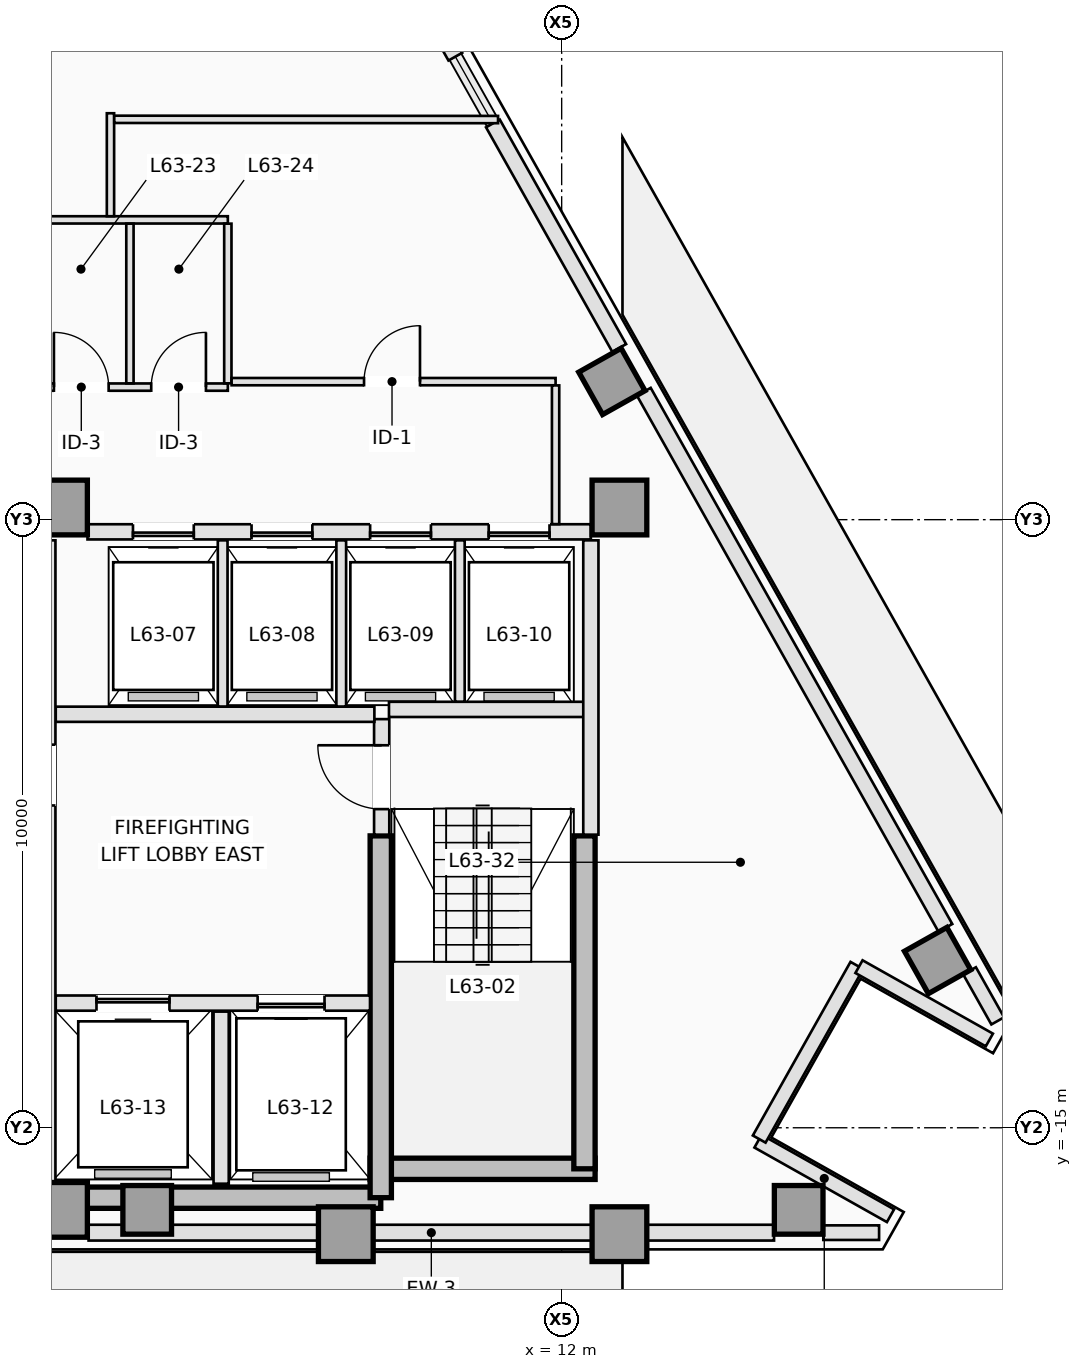
"""IFC4 building model, lengths in metres.
Left out: names, types, materials, properties, quantities, classifications, styles, units other than length and angle.
Written with IfcOpenShell. Run it as: python <this file> out.ifc"""

import sys

from ifc_helpers import new_model, si_unit, direction, frame, frame_2d, origin, origin_2d, place, context, subcontext, project, spatial, rectangle, extrude, element, fill, save


model = new_model("IFC4")
c1 = context("Model", 3, precision=1e-05, world=origin(), true_north=direction((0.0, 1.0)))
c2 = subcontext(c1, "Body", "Model", "MODEL_VIEW")
j1 = project(units=[si_unit("LENGTHUNIT", "METRE"), si_unit("PLANEANGLEUNIT", "RADIAN")], contexts=[c1])
p1 = place(None, origin())
s1 = spatial("IfcSite", under=j1, at=p1, CompositionType="ELEMENT")
p2 = place(p1, origin())
s2 = spatial("IfcBuilding", under=s1, at=p2, CompositionType="ELEMENT")
p3 = place(p2, frame((0.0, 0.0, 228.9)))
s3 = spatial("IfcBuildingStorey", under=s2, at=p3, CompositionType="ELEMENT", Elevation=228.9)
p4 = place(p3, frame((3.75, -16.15, 0.0), z_axis=(0.0, 0.0, 1.0), x_axis=(1.0, 0.0, 0.0)))
e1 = element("IfcWall", 1, at=p4, inside=s3, PredefinedType="SHEAR", context=c2, shape_type="SweptSolid", body=[
    extrude(rectangle(XDim=5.275, YDim=0.35, at=frame_2d((2.637, 0.0))), origin(), (0.0, 0.0, 1.0), 3.5),
])
p5 = place(p3, frame((8.85, -15.675, 0.0), z_axis=(0.0, 0.0, 1.0), x_axis=(1.0, 0.0, 0.0)))
e2 = element("IfcWall", 2, at=p5, inside=s3, PredefinedType="SHEAR", context=c2, shape_type="SweptSolid", body=[
    extrude(rectangle(XDim=3.7, YDim=0.35, at=frame_2d((1.85, 0.0))), origin(), (0.0, 0.0, 1.0), 3.5),
])
p6 = place(p3, frame((12.375, -15.675, 0.0), z_axis=(0.0, 0.0, 1.0), x_axis=(0.0, 1.0, 0.0)))
e3 = element("IfcWall", 3, at=p6, inside=s3, PredefinedType="SHEAR", context=c2, shape_type="SweptSolid", body=[
    extrude(rectangle(XDim=5.475, YDim=0.35, at=frame_2d((2.738, 0.0))), origin(), (0.0, 0.0, 1.0), 3.5),
])
p7 = place(p3, frame((9.025, -16.15, 0.0), z_axis=(0.0, 0.0, 1.0), x_axis=(0.0, 1.0, 0.0)))
e4 = element("IfcWall", 4, at=p7, inside=s3, PredefinedType="SHEAR", context=c2, shape_type="SweptSolid", body=[
    extrude(rectangle(XDim=5.95, YDim=0.35, at=frame_2d((2.975, 0.0))), origin(), (0.0, 0.0, 1.0), 3.5),
])
for number, where, z_axis, x_axis in (
    (5, (3.75, -16.35, 0.0), (0.0, 0.0, 1.0), (1.0, 0.0, 0.0)),
    (6, (8.45, -16.75, 0.0), (0.0, 0.0, 1.0), (1.0, 0.0, 0.0)),
    (7, (12.95, -16.75, 0.0), (0.0, 0.0, 1.0), (1.0, 0.0, 0.0)),
    (8, (3.75, -4.8, 0.0), (0.0, 0.0, 1.0), (1.0, 0.0, 0.0)),
    (9, (12.95, -4.8, 0.0), (0.0, 0.0, 1.0), (1.0, 0.0, 0.0)),
):
    element("IfcColumn", number, at=place(p3, frame(where, z_axis=z_axis, x_axis=x_axis)), inside=s3, PredefinedType="COLUMN", context=c2, shape_type="SweptSolid", body=[
        extrude(rectangle(XDim=0.9, YDim=0.9, at=origin_2d()), origin(), (0.0, 0.0, 1.0), 3.5),
    ])
for number, where, z_axis, x_axis in (
    (10, (5.184, -16.35, 0.0), (0.0, 0.0, 1.0), (0.0, 1.0, 0.0)),
    (11, (15.898, -16.35, 0.0), (0.0, 0.0, 1.0), (0.0, 1.0, 0.0)),
    (12, (18.182, -12.25, 0.0), (0.0, 0.0, 1.0), (0.872, 0.49, 0.0)),
    (13, (12.825, -2.727, 0.0), (0.0, 0.0, 1.0), (0.872, 0.49, 0.0)),
):
    element("IfcColumn", number, at=place(p3, frame(where, z_axis=z_axis, x_axis=x_axis)), inside=s3, PredefinedType="COLUMN", context=c2, shape_type="SweptSolid", body=[
        extrude(rectangle(XDim=0.8, YDim=0.8, at=origin_2d()), origin(), (0.0, 0.0, 1.0), 3.5),
    ])
p8 = place(p3, frame((17.22, -16.725, 0.0), z_axis=(0.0, 0.0, 1.0), x_axis=(-1.0, 0.0, 0.0)))
e14 = element("IfcWall", 14, at=p8, inside=s3, PredefinedType="STANDARD", context=c2, shape_type="SweptSolid", body=[
    extrude(rectangle(XDim=0.917, YDim=0.24, at=frame_2d((0.459, 0.0))), origin(), (0.0, 0.0, 1.0), 3.25),
])
p9 = place(p3, frame((15.493, -16.725, 0.0), z_axis=(0.0, 0.0, 1.0), x_axis=(-1.0, 0.0, 0.0)))
e15 = element("IfcWall", 15, at=p9, inside=s3, PredefinedType="STANDARD", context=c2, shape_type="SweptSolid", body=[
    extrude(rectangle(XDim=11.273, YDim=0.26, at=frame_2d((5.636, 0.0))), origin(), (0.0, 0.0, 1.0), 2.79),
])
p10 = place(p3, frame((18.708, -12.419, 0.0), z_axis=(0.0, 0.0, 1.0), x_axis=(0.490199895283, -0.871610040479, 0.0)))
e16 = element("IfcWall", 16, at=p10, inside=s3, PredefinedType="STANDARD", context=c2, shape_type="SweptSolid", body=[
    extrude(rectangle(XDim=0.945, YDim=0.24, at=frame_2d((0.472, 0.0))), origin(), (0.0, 0.0, 1.0), 3.25),
])
p11 = place(p3, frame((13.351, -2.896, 0.0), z_axis=(0.0, 0.0, 1.0), x_axis=(0.490266968583, -0.871572314565, 0.0)))
e17 = element("IfcWall", 17, at=p11, inside=s3, PredefinedType="STANDARD", context=c2, shape_type="SweptSolid", body=[
    extrude(rectangle(XDim=10.116, YDim=0.26, at=frame_2d((5.058, 0.0))), origin(), (0.0, 0.0, 1.0), 3.25),
])
p12 = place(p3, frame((8.174, 6.307, 0.0), z_axis=(0.0, 0.0, 1.0), x_axis=(0.490269447258, -0.871570920284, 0.0)))
e18 = element("IfcWall", 18, at=p12, inside=s3, PredefinedType="STANDARD", context=c2, shape_type="SweptSolid", body=[
    extrude(rectangle(XDim=4.237, YDim=0.26, at=frame_2d((2.118, 0.0))), origin(), (0.0, 0.0, 1.0), 3.25),
])
p13 = place(p3, frame((10.869, 1.516, 0.0), z_axis=(0.0, 0.0, 1.0), x_axis=(0.490244825075, -0.871584770109, 0.0)))
e19 = element("IfcWall", 19, at=p13, inside=s3, PredefinedType="STANDARD", context=c2, shape_type="SweptSolid", body=[
    extrude(rectangle(XDim=4.237, YDim=0.26, at=frame_2d((2.119, 0.0))), origin(), (0.0, 0.0, 1.0), 3.25),
])
p14 = place(p3, frame((17.408, -16.447, 0.0), z_axis=(0.0, 0.0, 1.0), x_axis=(-0.871588577066, 0.490238056792, 0.0)))
e20 = element("IfcWall", 20, at=p14, inside=s3, PredefinedType="STANDARD", context=c2, shape_type="SweptSolid", body=[
    extrude(rectangle(XDim=2.5, YDim=0.24, at=frame_2d((1.25, 0.0))), origin(), (0.0, 0.0, 1.0), 3.25),
])
p15 = place(p3, frame((15.248, -15.186, 0.0), z_axis=(0.0, 0.0, 1.0), x_axis=(0.490293083368, 0.871557624258, 0.0)))
e21 = element("IfcWall", 21, at=p15, inside=s3, PredefinedType="STANDARD", context=c2, shape_type="SweptSolid", body=[
    extrude(rectangle(XDim=3.276, YDim=0.24, at=frame_2d((1.638, 0.0))), origin(), (0.0, 0.0, 1.0), 2.79),
])
p16 = place(p3, frame((16.889, -12.35, 0.0), z_axis=(0.0, 0.0, 1.0), x_axis=(0.87157023615, -0.490270663468, 0.0)))
e22 = element("IfcWall", 22, at=p16, inside=s3, PredefinedType="STANDARD", context=c2, shape_type="SweptSolid", body=[
    extrude(rectangle(XDim=2.46, YDim=0.24, at=frame_2d((1.23, 0.0))), origin(), (0.0, 0.0, 1.0), 3.25),
])
p17 = place(p3, frame((9.04, -10.18, 0.0), z_axis=(0.0, 0.0, 1.0), x_axis=(0.0, 1.0, 0.0)))
e23 = element("IfcWall", 23, at=p17, inside=s3, PredefinedType="PARTITIONING", context=c2, shape_type="SweptSolid", body=[
    extrude(rectangle(XDim=1.9, YDim=0.25, at=frame_2d((0.95, 0.0))), origin(), (0.0, 0.0, 1.0), 3.25),
])
p18 = place(p17, frame((0.42, 0.0, 0.0)))
e24 = element("IfcOpeningElement", 24, at=p18, cuts=e23, PredefinedType="OPENING", context=c2, shape_type="SweptSolid", body=[
    extrude(rectangle(XDim=1.05, YDim=2.15, at=frame_2d((0.525, 1.075))), frame((0.0, 0.135, 0.0), z_axis=(0.0, -1.0, 0.0), x_axis=(1.0, 0.0, 0.0)), (0.0, 0.0, 1.0), 0.27),
])
p19 = place(p3, frame((9.16, -8.12, 0.0), z_axis=(0.0, 0.0, 1.0), x_axis=(1.0, 0.0, 0.0)))
e25 = element("IfcWall", 25, at=p19, inside=s3, PredefinedType="PARTITIONING", context=c2, shape_type="SweptSolid", body=[
    extrude(rectangle(XDim=3.22, YDim=0.25, at=frame_2d((1.61, 0.0))), origin(), (0.0, 0.0, 1.0), 3.25),
])
p20 = place(p3, frame((12.48, -10.18, 0.0), z_axis=(0.0, 0.0, 1.0), x_axis=(0.0, 1.0, 0.0)))
e26 = element("IfcWall", 26, at=p20, inside=s3, PredefinedType="PARTITIONING", context=c2, shape_type="SweptSolid", body=[
    extrude(rectangle(XDim=4.84, YDim=0.25, at=frame_2d((2.42, 0.0))), origin(), (0.0, 0.0, 1.0), 3.25),
])
p21 = place(p3, frame((3.68, -12.95, 0.0), z_axis=(0.0, 0.0, 1.0), x_axis=(1.0, 0.0, 0.0)))
e27 = element("IfcWall", 27, at=p21, inside=s3, PredefinedType="PARTITIONING", context=c2, shape_type="SweptSolid", body=[
    extrude(rectangle(XDim=5.168, YDim=0.25, at=frame_2d((2.584, 0.0))), origin(), (0.0, 0.0, 1.0), 3.25),
])
p22 = place(p21, frame((3.32, 0.0, 0.0)))
e28 = element("IfcOpeningElement", 28, at=p22, cuts=e27, PredefinedType="OPENING", context=c2, shape_type="SweptSolid", body=[
    extrude(rectangle(XDim=1.1, YDim=2.15, at=frame_2d((0.55, 1.075))), frame((0.0, 0.135, 0.0), z_axis=(0.0, -1.0, 0.0), x_axis=(1.0, 0.0, 0.0)), (0.0, 0.0, 1.0), 0.27),
])
p23 = place(p21, frame((0.67, 0.0, 0.0)))
e29 = element("IfcOpeningElement", 29, at=p23, cuts=e27, PredefinedType="OPENING", context=c2, shape_type="SweptSolid", body=[
    extrude(rectangle(XDim=1.2, YDim=2.15, at=frame_2d((0.6, 1.075))), frame((0.0, 0.135, 0.0), z_axis=(0.0, -1.0, 0.0), x_axis=(1.0, 0.0, 0.0)), (0.0, 0.0, 1.0), 0.27),
])
p24 = place(p3, frame((6.4, -15.92, 0.0), z_axis=(0.0, 0.0, 1.0), x_axis=(0.0, 1.0, 0.0)))
e30 = element("IfcWall", 30, at=p24, inside=s3, PredefinedType="PARTITIONING", context=c2, shape_type="SweptSolid", body=[
    extrude(rectangle(XDim=2.83, YDim=0.25, at=frame_2d((1.415, 0.0))), origin(), (0.0, 0.0, 1.0), 3.25),
])
p25 = place(p3, frame((3.68, -8.2, 0.0), z_axis=(0.0, 0.0, 1.0), x_axis=(1.0, 0.0, 0.0)))
e31 = element("IfcWall", 31, at=p25, inside=s3, PredefinedType="PARTITIONING", context=c2, shape_type="SweptSolid", body=[
    extrude(rectangle(XDim=5.24, YDim=0.25, at=frame_2d((2.62, 0.0))), origin(), (0.0, 0.0, 1.0), 3.25),
])
p26 = place(p3, frame((3.55, -15.898, 0.0), z_axis=(0.0, 0.0, 1.0), x_axis=(0.0, 1.0, 0.0)))
e32 = element("IfcWall", 32, at=p26, inside=s3, PredefinedType="PARTITIONING", context=c2, shape_type="SweptSolid", body=[
    extrude(rectangle(XDim=10.558, YDim=0.25, at=frame_2d((5.279, 0.0))), origin(), (0.0, 0.0, 1.0), 3.25),
])
p27 = place(p26, frame((6.198, 0.0, 0.0)))
e33 = element("IfcOpeningElement", 33, at=p27, cuts=e32, PredefinedType="OPENING", context=c2, shape_type="SweptSolid", body=[
    extrude(rectangle(XDim=1.0, YDim=2.15, at=frame_2d((0.5, 1.075))), frame((0.0, 0.135, 0.0), z_axis=(0.0, -1.0, 0.0), x_axis=(1.0, 0.0, 0.0)), (0.0, 0.0, 1.0), 0.27),
])
p28 = place(p3, frame((4.202, -5.2, 0.0), z_axis=(0.0, 0.0, 1.0), x_axis=(1.0, 0.0, 0.0)))
e34 = element("IfcWall", 34, at=p28, inside=s3, PredefinedType="PARTITIONING", context=c2, shape_type="SweptSolid", body=[
    extrude(rectangle(XDim=8.278, YDim=0.25, at=frame_2d((4.139, 0.0))), origin(), (0.0, 0.0, 1.0), 3.25),
])
p29 = place(p28, frame((0.748, 0.0, 0.0)))
e35 = element("IfcOpeningElement", 35, at=p29, cuts=e34, PredefinedType="OPENING", context=c2, shape_type="SweptSolid", body=[
    extrude(rectangle(XDim=1.0, YDim=2.15, at=frame_2d((0.5, 1.075))), frame((0.0, 0.135, 0.0), z_axis=(0.0, -1.0, 0.0), x_axis=(1.0, 0.0, 0.0)), (0.0, 0.0, 1.0), 0.27),
])
p30 = place(p28, frame((2.698, 0.0, 0.0)))
e36 = element("IfcOpeningElement", 36, at=p30, cuts=e34, PredefinedType="OPENING", context=c2, shape_type="SweptSolid", body=[
    extrude(rectangle(XDim=1.0, YDim=2.15, at=frame_2d((0.5, 1.075))), frame((0.0, 0.135, 0.0), z_axis=(0.0, -1.0, 0.0), x_axis=(1.0, 0.0, 0.0)), (0.0, 0.0, 1.0), 0.27),
])
p31 = place(p28, frame((4.648, 0.0, 0.0)))
e37 = element("IfcOpeningElement", 37, at=p31, cuts=e34, PredefinedType="OPENING", context=c2, shape_type="SweptSolid", body=[
    extrude(rectangle(XDim=1.0, YDim=2.15, at=frame_2d((0.5, 1.075))), frame((0.0, 0.135, 0.0), z_axis=(0.0, -1.0, 0.0), x_axis=(1.0, 0.0, 0.0)), (0.0, 0.0, 1.0), 0.27),
])
p32 = place(p28, frame((6.598, 0.0, 0.0)))
e38 = element("IfcOpeningElement", 38, at=p32, cuts=e34, PredefinedType="OPENING", context=c2, shape_type="SweptSolid", body=[
    extrude(rectangle(XDim=1.0, YDim=2.15, at=frame_2d((0.5, 1.075))), frame((0.0, 0.135, 0.0), z_axis=(0.0, -1.0, 0.0), x_axis=(1.0, 0.0, 0.0)), (0.0, 0.0, 1.0), 0.27),
])
for number, where, z_axis, x_axis in (
    (39, (6.425, -8.073, 0.0), (0.0, 0.0, 1.0), (0.0, 1.0, 0.0)),
    (40, (8.375, -8.073, 0.0), (0.0, 0.0, 1.0), (0.0, 1.0, 0.0)),
):
    element("IfcWall", number, at=place(p3, frame(where, z_axis=z_axis, x_axis=x_axis)), inside=s3, PredefinedType="PARTITIONING", context=c2, shape_type="SweptSolid", body=[
        extrude(rectangle(XDim=2.733, YDim=0.16, at=frame_2d((1.366, 0.0))), origin(), (0.0, 0.0, 1.0), 3.25),
    ])
p33 = place(p3, frame((10.325, -7.993, 0.0), z_axis=(0.0, 0.0, 1.0), x_axis=(0.0, 1.0, 0.0)))
e41 = element("IfcWall", 41, at=p33, inside=s3, PredefinedType="PARTITIONING", context=c2, shape_type="SweptSolid", body=[
    extrude(rectangle(XDim=2.653, YDim=0.16, at=frame_2d((1.326, 0.0))), origin(), (0.0, 0.0, 1.0), 3.25),
])
p34 = place(p3, frame((3.29, -2.82, 0.0), z_axis=(0.0, 0.0, 1.0), x_axis=(1.0, 0.0, 0.0)))
e42 = element("IfcWall", 42, at=p34, inside=s3, PredefinedType="PARTITIONING", context=c2, shape_type="SweptSolid", body=[
    extrude(rectangle(XDim=3.22, YDim=0.12, at=frame_2d((1.61, 0.0))), origin(), (0.0, 0.0, 1.0), 2.943),
])
p35 = place(p34, frame((0.36, 0.0, 0.0)))
e43 = element("IfcOpeningElement", 43, at=p35, cuts=e42, PredefinedType="OPENING", context=c2, shape_type="SweptSolid", body=[
    extrude(rectangle(XDim=0.9, YDim=2.12, at=frame_2d((0.45, 1.06))), frame((0.0, 0.07, 0.0), z_axis=(0.0, -1.0, 0.0), x_axis=(1.0, 0.0, 0.0)), (0.0, 0.0, 1.0), 0.14),
])
p36 = place(p34, frame((1.96, 0.0, 0.0)))
e44 = element("IfcOpeningElement", 44, at=p36, cuts=e42, PredefinedType="OPENING", context=c2, shape_type="SweptSolid", body=[
    extrude(rectangle(XDim=0.9, YDim=2.12, at=frame_2d((0.45, 1.06))), frame((0.0, 0.07, 0.0), z_axis=(0.0, -1.0, 0.0), x_axis=(1.0, 0.0, 0.0)), (0.0, 0.0, 1.0), 0.14),
])
p37 = place(p3, frame((3.29, -0.07, 0.0), z_axis=(0.0, 0.0, 1.0), x_axis=(1.0, 0.0, 0.0)))
e45 = element("IfcWall", 45, at=p37, inside=s3, PredefinedType="PARTITIONING", context=c2, shape_type="SweptSolid", body=[
    extrude(rectangle(XDim=3.22, YDim=0.12, at=frame_2d((1.61, 0.0))), origin(), (0.0, 0.0, 1.0), 3.25),
])
for number, where, z_axis, x_axis in (
    (46, (4.9, -2.758, 0.0), (0.0, 0.0, 1.0), (0.0, 1.0, 0.0)),
    (47, (6.51, -2.758, 0.0), (0.0, 0.0, 1.0), (0.0, 1.0, 0.0)),
):
    element("IfcWall", number, at=place(p3, frame(where, z_axis=z_axis, x_axis=x_axis)), inside=s3, PredefinedType="PARTITIONING", context=c2, shape_type="SweptSolid", body=[
        extrude(rectangle(XDim=2.626, YDim=0.12, at=frame_2d((1.313, 0.0))), origin(), (0.0, 0.0, 1.0), 3.25),
    ])
p38 = place(p3, frame((6.572, -2.73, 0.0), z_axis=(0.0, 0.0, 1.0), x_axis=(1.0, 0.0, 0.0)))
e48 = element("IfcWall", 48, at=p38, inside=s3, PredefinedType="PARTITIONING", context=c2, shape_type="SweptSolid", body=[
    extrude(rectangle(XDim=5.328, YDim=0.12, at=frame_2d((2.664, 0.0))), origin(), (0.0, 0.0, 1.0), 3.25),
])
p39 = place(p38, frame((2.178, 0.0, 0.0)))
e49 = element("IfcOpeningElement", 49, at=p39, cuts=e48, PredefinedType="OPENING", context=c2, shape_type="SweptSolid", body=[
    extrude(rectangle(XDim=0.92, YDim=2.12, at=frame_2d((0.46, 1.06))), frame((0.0, 0.07, 0.0), z_axis=(0.0, -1.0, 0.0), x_axis=(1.0, 0.0, 0.0)), (0.0, 0.0, 1.0), 0.14),
])
p40 = place(p3, frame((11.9, -2.792, 0.0), z_axis=(0.0, 0.0, 1.0), x_axis=(0.0, -1.0, 0.0)))
e50 = element("IfcWall", 50, at=p40, inside=s3, PredefinedType="PARTITIONING", context=c2, shape_type="SweptSolid", body=[
    extrude(rectangle(XDim=2.281, YDim=0.12, at=frame_2d((1.141, 0.0))), origin(), (0.0, 0.0, 1.0), 3.25),
])
p41 = place(p3, frame((4.58, 1.684, 0.0), z_axis=(0.0, 0.0, 1.0), x_axis=(0.0, -1.0, 0.0)))
e51 = element("IfcWall", 51, at=p41, inside=s3, PredefinedType="PARTITIONING", context=c2, shape_type="SweptSolid", body=[
    extrude(rectangle(XDim=1.694, YDim=0.12, at=frame_2d((0.847, 0.0))), origin(), (0.0, 0.0, 1.0), 3.25),
])
p42 = place(p3, frame((10.954, 1.58, 0.0), z_axis=(0.0, 0.0, 1.0), x_axis=(-0.999999831682, 0.00058020336, 0.0)))
e52 = element("IfcWall", 52, at=p42, inside=s3, PredefinedType="PARTITIONING", context=c2, shape_type="SweptSolid", body=[
    extrude(rectangle(XDim=6.312, YDim=0.12, at=frame_2d((3.156, 0.0))), origin(), (0.0, 0.0, 1.0), 3.25),
])
p43 = place(p29, origin())
e53 = element("IfcDoor", 53, at=p43, inside=s3, OperationType="SLIDING_TO_RIGHT", PredefinedType="DOOR", context=c2, shape_type="SweptSolid", body=[
    extrude(rectangle(XDim=1.0, YDim=2.15, at=frame_2d((0.5, 1.075))), frame((0.0, 0.025, 0.0), z_axis=(0.0, -1.0, 0.0), x_axis=(1.0, 0.0, 0.0)), (0.0, 0.0, 1.0), 0.05),
])
fill(e35, e53)
p44 = place(p30, origin())
e54 = element("IfcDoor", 54, at=p44, inside=s3, OperationType="SLIDING_TO_RIGHT", PredefinedType="DOOR", context=c2, shape_type="SweptSolid", body=[
    extrude(rectangle(XDim=1.0, YDim=2.15, at=frame_2d((0.5, 1.075))), frame((0.0, 0.025, 0.0), z_axis=(0.0, -1.0, 0.0), x_axis=(1.0, 0.0, 0.0)), (0.0, 0.0, 1.0), 0.05),
])
fill(e36, e54)
p45 = place(p31, origin())
e55 = element("IfcDoor", 55, at=p45, inside=s3, OperationType="SLIDING_TO_RIGHT", PredefinedType="DOOR", context=c2, shape_type="SweptSolid", body=[
    extrude(rectangle(XDim=1.0, YDim=2.15, at=frame_2d((0.5, 1.075))), frame((0.0, 0.025, 0.0), z_axis=(0.0, -1.0, 0.0), x_axis=(1.0, 0.0, 0.0)), (0.0, 0.0, 1.0), 0.05),
])
fill(e37, e55)
p46 = place(p32, origin())
e56 = element("IfcDoor", 56, at=p46, inside=s3, OperationType="SLIDING_TO_RIGHT", PredefinedType="DOOR", context=c2, shape_type="SweptSolid", body=[
    extrude(rectangle(XDim=1.0, YDim=2.15, at=frame_2d((0.5, 1.075))), frame((0.0, 0.025, 0.0), z_axis=(0.0, -1.0, 0.0), x_axis=(1.0, 0.0, 0.0)), (0.0, 0.0, 1.0), 0.05),
])
fill(e38, e56)
p47 = place(p22, origin())
e57 = element("IfcDoor", 57, at=p47, inside=s3, OperationType="SLIDING_TO_RIGHT", PredefinedType="DOOR", context=c2, shape_type="SweptSolid", body=[
    extrude(rectangle(XDim=1.1, YDim=2.15, at=frame_2d((0.55, 1.075))), frame((0.0, 0.025, 0.0), z_axis=(0.0, -1.0, 0.0), x_axis=(1.0, 0.0, 0.0)), (0.0, 0.0, 1.0), 0.05),
])
fill(e28, e57)
p48 = place(p23, origin())
e58 = element("IfcDoor", 58, at=p48, inside=s3, OperationType="SLIDING_TO_LEFT", PredefinedType="DOOR", context=c2, shape_type="SweptSolid", body=[
    extrude(rectangle(XDim=1.2, YDim=2.15, at=frame_2d((0.6, 1.075))), frame((0.0, 0.025, 0.0), z_axis=(0.0, -1.0, 0.0), x_axis=(1.0, 0.0, 0.0)), (0.0, 0.0, 1.0), 0.05),
])
fill(e29, e58)
p49 = place(p18, origin())
e59 = element("IfcDoor", 59, at=p49, inside=s3, OperationType="SINGLE_SWING_RIGHT", PredefinedType="DOOR", context=c2, shape_type="SweptSolid", body=[
    extrude(rectangle(XDim=1.05, YDim=2.15, at=frame_2d((0.525, 1.075))), frame((0.0, 0.025, 0.0), z_axis=(0.0, -1.0, 0.0), x_axis=(1.0, 0.0, 0.0)), (0.0, 0.0, 1.0), 0.05),
])
fill(e24, e59)
p50 = place(p35, origin())
e60 = element("IfcDoor", 60, at=p50, inside=s3, OperationType="SINGLE_SWING_LEFT", PredefinedType="DOOR", context=c2, shape_type="SweptSolid", body=[
    extrude(rectangle(XDim=0.9, YDim=2.12, at=frame_2d((0.45, 1.06))), frame((0.0, 0.025, 0.0), z_axis=(0.0, -1.0, 0.0), x_axis=(1.0, 0.0, 0.0)), (0.0, 0.0, 1.0), 0.05),
])
fill(e43, e60)
p51 = place(p36, origin())
e61 = element("IfcDoor", 61, at=p51, inside=s3, OperationType="SINGLE_SWING_RIGHT", PredefinedType="DOOR", context=c2, shape_type="SweptSolid", body=[
    extrude(rectangle(XDim=0.9, YDim=2.12, at=frame_2d((0.45, 1.06))), frame((0.0, 0.025, 0.0), z_axis=(0.0, -1.0, 0.0), x_axis=(1.0, 0.0, 0.0)), (0.0, 0.0, 1.0), 0.05),
])
fill(e44, e61)
p52 = place(p39, origin())
e62 = element("IfcDoor", 62, at=p52, inside=s3, OperationType="SINGLE_SWING_RIGHT", PredefinedType="DOOR", context=c2, shape_type="SweptSolid", body=[
    extrude(rectangle(XDim=0.92, YDim=2.12, at=frame_2d((0.46, 1.06))), frame((0.0, 0.025, 0.0), z_axis=(0.0, -1.0, 0.0), x_axis=(1.0, 0.0, 0.0)), (0.0, 0.0, 1.0), 0.05),
])
fill(e49, e62)
save(model, sys.argv[1])
